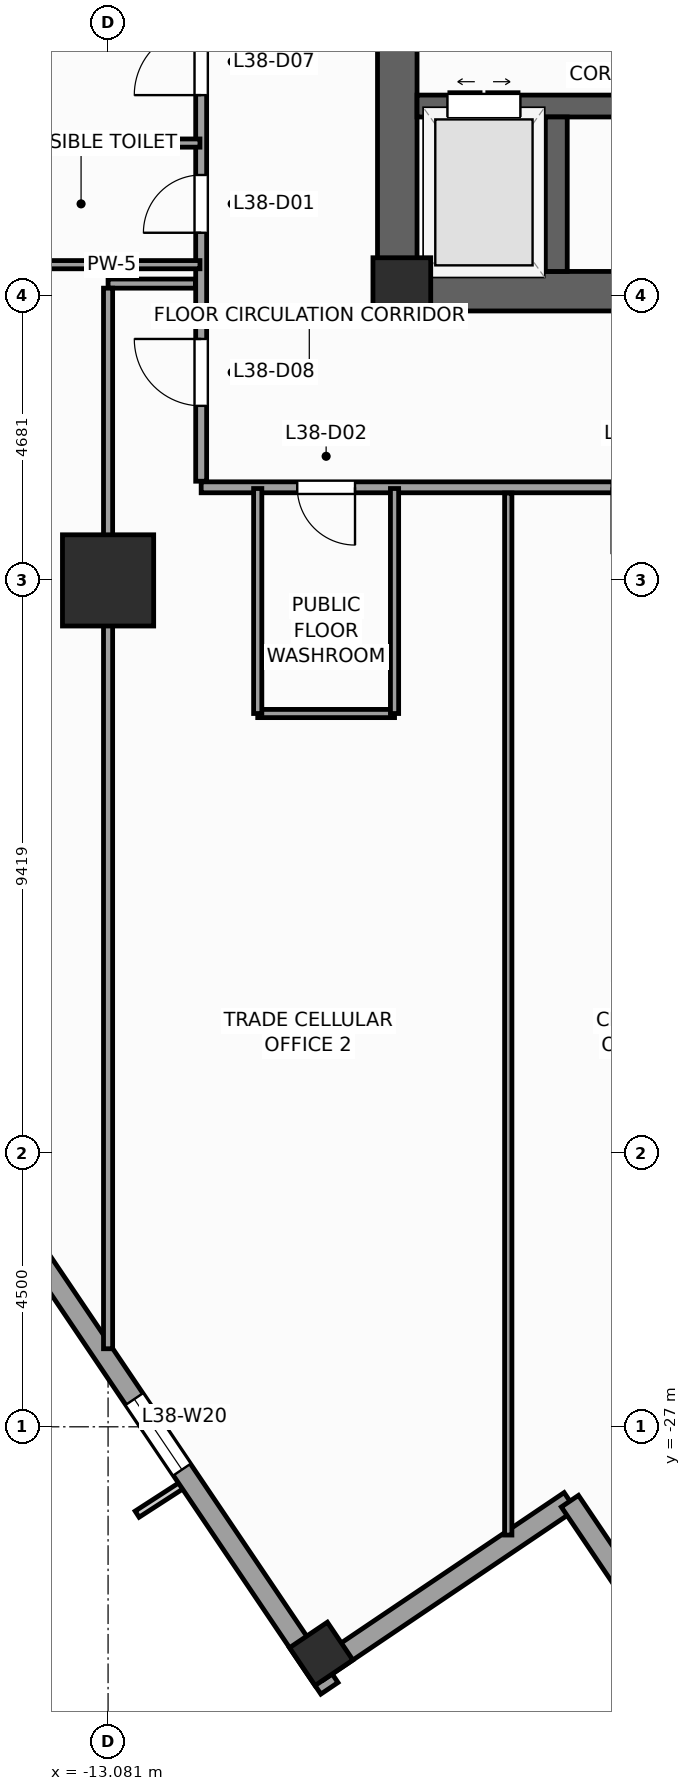
"""IFC4 building model, lengths in metres.
Left out: names, types, materials, properties, quantities, classifications, styles, units other than length and angle.
Written with IfcOpenShell. Run it as: python <this file> out.ifc"""

import sys

from ifc_helpers import new_model, si_unit, direction, frame, frame_2d, origin, origin_2d, place, context, subcontext, project, spatial, rectangle, extrude, source, transform, mapped, element, fill, save


model = new_model("IFC4")
c1 = context("Model", 3, precision=1e-05, world=origin(), true_north=direction((0.0, 1.0)))
c2 = subcontext(c1, "Body", "Model", "MODEL_VIEW")
j1 = project(units=[si_unit("LENGTHUNIT", "METRE"), si_unit("PLANEANGLEUNIT", "RADIAN")], contexts=[c1])
p1 = place(None, origin())
s1 = spatial("IfcSite", under=j1, at=p1, CompositionType="ELEMENT")
p2 = place(p1, origin())
s2 = spatial("IfcBuilding", under=s1, at=p2, CompositionType="ELEMENT")
p3 = place(p2, frame((0.0, 0.0, 160.4)))
s3 = spatial("IfcBuildingStorey", under=s2, at=p3, CompositionType="ELEMENT", Elevation=160.4)
p4 = place(p3, frame((-8.65, -8.325, 0.0), z_axis=(0.0, 0.0, 1.0), x_axis=(1.0, 0.0, 0.0)))
e1 = element("IfcWall", 1, at=p4, inside=s3, PredefinedType="SHEAR", context=c2, shape_type="SweptSolid", body=[
    extrude(rectangle(XDim=17.3, YDim=0.65, at=frame_2d((8.65, 0.0))), origin(), (0.0, 0.0, 1.0), 4.0),
])
p5 = place(p4, frame((8.0, 0.0, 0.0)))
e2 = element("IfcOpeningElement", 2, at=p5, cuts=e1, PredefinedType="OPENING", context=c2, shape_type="SweptSolid", body=[
    extrude(rectangle(XDim=1.3, YDim=2.2, at=frame_2d((0.65, 1.1))), frame((0.0, 0.335, 0.0), z_axis=(0.0, -1.0, 0.0), x_axis=(1.0, 0.0, 0.0)), (0.0, 0.0, 1.0), 0.67),
])
p6 = place(p3, frame((-8.325, -8.0, 0.0), z_axis=(0.0, 0.0, 1.0), x_axis=(0.0, 1.0, 0.0)))
e3 = element("IfcWall", 3, at=p6, inside=s3, PredefinedType="SHEAR", context=c2, shape_type="SweptSolid", body=[
    extrude(rectangle(XDim=16.0, YDim=0.65, at=frame_2d((8.0, 0.0))), origin(), (0.0, 0.0, 1.0), 4.0),
])
p7 = place(p6, frame((4.69, 0.0, 0.0)))
e4 = element("IfcOpeningElement", 4, at=p7, cuts=e3, PredefinedType="OPENING", context=c2, shape_type="SweptSolid", body=[
    extrude(rectangle(XDim=1.3, YDim=2.2, at=frame_2d((0.65, 1.1))), frame((0.0, 0.335, 0.0), z_axis=(0.0, -1.0, 0.0), x_axis=(1.0, 0.0, 0.0)), (0.0, 0.0, 1.0), 0.67),
])
p8 = place(p3, frame((-8.0, -5.28, 0.0), z_axis=(0.0, 0.0, 1.0), x_axis=(1.0, 0.0, 0.0)))
e5 = element("IfcWall", 5, at=p8, inside=s3, PredefinedType="SHEAR", context=c2, shape_type="SweptSolid", body=[
    extrude(rectangle(XDim=3.46, YDim=0.36, at=frame_2d((1.73, 0.0))), origin(), (0.0, 0.0, 1.0), 4.0),
])
p9 = place(p8, frame((0.5, 0.0, 0.0)))
e6 = element("IfcOpeningElement", 6, at=p9, cuts=e5, PredefinedType="OPENING", context=c2, shape_type="SweptSolid", body=[
    extrude(rectangle(XDim=1.2, YDim=2.25, at=frame_2d((0.6, 1.125))), frame((0.0, 0.19, 0.0), z_axis=(0.0, -1.0, 0.0), x_axis=(1.0, 0.0, 0.0)), (0.0, 0.0, 1.0), 0.38),
])
p10 = place(p3, frame((-5.71, -8.0, 0.0), z_axis=(0.0, 0.0, 1.0), x_axis=(0.0, 1.0, 0.0)))
e7 = element("IfcWall", 7, at=p10, inside=s3, PredefinedType="SHEAR", context=c2, shape_type="SweptSolid", body=[
    extrude(rectangle(XDim=2.54, YDim=0.36, at=frame_2d((1.27, 0.0))), origin(), (0.0, 0.0, 1.0), 4.0),
])
m1 = source(origin(), c2, "Body", "SweptSolid", [
    extrude(rectangle(XDim=0.95, YDim=0.95, at=origin_2d()), origin(), (0.0, 0.0, 1.0), 4.0),
])
p11 = place(p3, frame((-8.25, -8.25, 0.0), z_axis=(0.0, 0.0, 1.0), x_axis=(1.0, 0.0, 0.0)))
e8 = element("IfcColumn", 8, at=p11, inside=s3, PredefinedType="PILASTER", context=c2, shape_type="MappedRepresentation", body=[
    mapped(m1, transform((0.0, 0.0, 0.0), scale=1.0)),
])
m2 = source(origin(), c2, "Body", "SweptSolid", [
    extrude(rectangle(XDim=1.5, YDim=1.5, at=origin_2d()), origin(), (0.0, 0.0, 1.0), 4.0),
])
p12 = place(p3, frame((-13.081, -13.081, 0.0), z_axis=(0.0, 0.0, 1.0), x_axis=(1.0, 0.0, 0.0)))
e9 = element("IfcColumn", 9, at=p12, inside=s3, PredefinedType="COLUMN", context=c2, shape_type="MappedRepresentation", body=[
    mapped(m2, transform((0.0, 0.0, 0.0), scale=1.0)),
])
m3 = source(origin(), c2, "Body", "SweptSolid", [
    extrude(rectangle(XDim=0.75, YDim=0.75, at=origin_2d()), origin(), (0.0, 0.0, 1.0), 4.0),
])
p13 = place(p3, frame((-9.576, -30.734, 0.0), z_axis=(0.0, 0.0, 1.0), x_axis=(0.829037572555, 0.559192903471, 0.0)))
e10 = element("IfcColumn", 10, at=p13, inside=s3, PredefinedType="COLUMN", context=c2, shape_type="MappedRepresentation", body=[
    mapped(m3, transform((0.0, 0.0, 0.0), scale=1.0)),
])
p14 = place(p3, frame((-32.558, 2.972, 0.0), z_axis=(0.0, 0.0, 1.0), x_axis=(0.559194910251, -0.829036218961, 0.0)))
e11 = element("IfcWall", 11, at=p14, inside=s3, PredefinedType="STANDARD", context=c2, shape_type="SweptSolid", body=[
    extrude(rectangle(XDim=41.34, YDim=0.34, at=frame_2d((20.67, 0.0))), origin(), (0.0, 0.0, 1.0), 3.04),
])
p15 = place(p14, frame((5.761, 0.0, 0.56)))
e12 = element("IfcOpeningElement", 12, at=p15, cuts=e11, PredefinedType="OPENING", context=c2, shape_type="SweptSolid", body=[
    extrude(rectangle(XDim=1.4, YDim=2.4, at=frame_2d((0.7, 1.2))), frame((0.0, 0.18, 0.0), z_axis=(0.0, -1.0, 0.0), x_axis=(1.0, 0.0, 0.0)), (0.0, 0.0, 1.0), 0.36),
])
p16 = place(p14, frame((11.064, 0.0, 0.61)))
e13 = element("IfcOpeningElement", 13, at=p16, cuts=e11, PredefinedType="OPENING", context=c2, shape_type="SweptSolid", body=[
    extrude(rectangle(XDim=1.85, YDim=2.35, at=frame_2d((0.925, 1.175))), frame((0.0, 0.18, 0.0), z_axis=(0.0, -1.0, 0.0), x_axis=(1.0, 0.0, 0.0)), (0.0, 0.0, 1.0), 0.36),
])
p17 = place(p14, frame((18.168, 0.0, 0.61)))
e14 = element("IfcOpeningElement", 14, at=p17, cuts=e11, PredefinedType="OPENING", context=c2, shape_type="SweptSolid", body=[
    extrude(rectangle(XDim=1.85, YDim=2.35, at=frame_2d((0.925, 1.175))), frame((0.0, 0.18, 0.0), z_axis=(0.0, -1.0, 0.0), x_axis=(1.0, 0.0, 0.0)), (0.0, 0.0, 1.0), 0.36),
])
p18 = place(p14, frame((27.186, 0.0, 0.61)))
e15 = element("IfcOpeningElement", 15, at=p18, cuts=e11, PredefinedType="OPENING", context=c2, shape_type="SweptSolid", body=[
    extrude(rectangle(XDim=1.85, YDim=2.35, at=frame_2d((0.925, 1.175))), frame((0.0, 0.18, 0.0), z_axis=(0.0, -1.0, 0.0), x_axis=(1.0, 0.0, 0.0)), (0.0, 0.0, 1.0), 0.36),
])
p19 = place(p14, frame((35.602, 0.0, 0.56)))
e16 = element("IfcOpeningElement", 16, at=p19, cuts=e11, PredefinedType="OPENING", context=c2, shape_type="SweptSolid", body=[
    extrude(rectangle(XDim=1.4, YDim=2.4, at=frame_2d((0.7, 1.2))), frame((0.0, 0.18, 0.0), z_axis=(0.0, -1.0, 0.0), x_axis=(1.0, 0.0, 0.0)), (0.0, 0.0, 1.0), 0.36),
])
p20 = place(p3, frame((-9.631, -31.019, 0.0), z_axis=(0.0, 0.0, 1.0), x_axis=(0.829025804298, 0.559210350234, 0.0)))
e17 = element("IfcWall", 17, at=p20, inside=s3, PredefinedType="STANDARD", context=c2, shape_type="SweptSolid", body=[
    extrude(rectangle(XDim=5.0, YDim=0.34, at=frame_2d((2.5, 0.0))), origin(), (0.0, 0.0, 1.0), 3.74),
])
p21 = place(p3, frame((-5.486, -28.223, 0.0), z_axis=(0.0, 0.0, 1.0), x_axis=(0.559171107879, -0.82905227345, 0.0)))
e18 = element("IfcWall", 18, at=p21, inside=s3, PredefinedType="STANDARD", context=c2, shape_type="SweptSolid", body=[
    extrude(rectangle(XDim=5.17, YDim=0.34, at=frame_2d((2.585, 0.0))), origin(), (0.0, 0.0, 1.0), 3.04),
])
p22 = place(p21, frame((1.885, 0.0, 0.56)))
e19 = element("IfcOpeningElement", 19, at=p22, cuts=e18, PredefinedType="OPENING", context=c2, shape_type="SweptSolid", body=[
    extrude(rectangle(XDim=1.4, YDim=2.4, at=frame_2d((0.7, 1.2))), frame((0.0, 0.18, 0.0), z_axis=(0.0, -1.0, 0.0), x_axis=(1.0, 0.0, 0.0)), (0.0, 0.0, 1.0), 0.36),
])
p23 = place(p3, frame((-11.55, -11.55, 0.0), z_axis=(0.0, 0.0, 1.0), x_axis=(1.0, 0.0, 0.0)))
e20 = element("IfcWall", 20, at=p23, inside=s3, PredefinedType="PARTITIONING", context=c2, shape_type="SweptSolid", body=[
    extrude(rectangle(XDim=22.0, YDim=0.18, at=frame_2d((11.0, 0.0))), origin(), (0.0, 0.0, 1.0), 3.74),
])
p24 = place(p23, frame((1.58, 0.0, 0.0)))
e21 = element("IfcOpeningElement", 21, at=p24, cuts=e20, PredefinedType="OPENING", context=c2, shape_type="SweptSolid", body=[
    extrude(rectangle(XDim=0.95, YDim=2.1, at=frame_2d((0.475, 1.05))), frame((0.0, 0.1, 0.0), z_axis=(0.0, -1.0, 0.0), x_axis=(1.0, 0.0, 0.0)), (0.0, 0.0, 1.0), 0.2),
])
p25 = place(p23, frame((6.75, 0.0, 0.0)))
e22 = element("IfcOpeningElement", 22, at=p25, cuts=e20, PredefinedType="OPENING", context=c2, shape_type="SweptSolid", body=[
    extrude(rectangle(XDim=1.1, YDim=2.2, at=frame_2d((0.55, 1.1))), frame((0.0, 0.1, 0.0), z_axis=(0.0, -1.0, 0.0), x_axis=(1.0, 0.0, 0.0)), (0.0, 0.0, 1.0), 0.2),
])
p26 = place(p23, frame((11.25, 0.0, 0.0)))
e23 = element("IfcOpeningElement", 23, at=p26, cuts=e20, PredefinedType="OPENING", context=c2, shape_type="SweptSolid", body=[
    extrude(rectangle(XDim=1.1, YDim=2.2, at=frame_2d((0.55, 1.1))), frame((0.0, 0.1, 0.0), z_axis=(0.0, -1.0, 0.0), x_axis=(1.0, 0.0, 0.0)), (0.0, 0.0, 1.0), 0.2),
])
p27 = place(p23, frame((15.75, 0.0, 0.0)))
e24 = element("IfcOpeningElement", 24, at=p27, cuts=e20, PredefinedType="OPENING", context=c2, shape_type="SweptSolid", body=[
    extrude(rectangle(XDim=1.1, YDim=2.2, at=frame_2d((0.55, 1.1))), frame((0.0, 0.1, 0.0), z_axis=(0.0, -1.0, 0.0), x_axis=(1.0, 0.0, 0.0)), (0.0, 0.0, 1.0), 0.2),
])
p28 = place(p23, frame((19.561, 0.0, 0.0)))
e25 = element("IfcOpeningElement", 25, at=p28, cuts=e20, PredefinedType="OPENING", context=c2, shape_type="SweptSolid", body=[
    extrude(rectangle(XDim=1.1, YDim=2.2, at=frame_2d((0.55, 1.1))), frame((0.0, 0.1, 0.0), z_axis=(0.0, -1.0, 0.0), x_axis=(1.0, 0.0, 0.0)), (0.0, 0.0, 1.0), 0.2),
])
p29 = place(p3, frame((-11.55, -11.45, 0.0), z_axis=(0.0, 0.0, 1.0), x_axis=(0.0, 1.0, 0.0)))
e26 = element("IfcWall", 26, at=p29, inside=s3, PredefinedType="PARTITIONING", context=c2, shape_type="SweptSolid", body=[
    extrude(rectangle(XDim=13.05, YDim=0.18, at=frame_2d((6.525, 0.0))), origin(), (0.0, 0.0, 1.0), 3.74),
])
p30 = place(p29, frame((4.086, 0.0, 0.0)))
e27 = element("IfcOpeningElement", 27, at=p30, cuts=e26, PredefinedType="OPENING", context=c2, shape_type="SweptSolid", body=[
    extrude(rectangle(XDim=0.95, YDim=2.1, at=frame_2d((0.475, 1.05))), frame((0.0, 0.1, 0.0), z_axis=(0.0, -1.0, 0.0), x_axis=(1.0, 0.0, 0.0)), (0.0, 0.0, 1.0), 0.2),
])
p31 = place(p29, frame((11.01, 0.0, 0.0)))
e28 = element("IfcOpeningElement", 28, at=p31, cuts=e26, PredefinedType="OPENING", context=c2, shape_type="SweptSolid", body=[
    extrude(rectangle(XDim=1.1, YDim=2.2, at=frame_2d((0.55, 1.1))), frame((0.0, 0.1, 0.0), z_axis=(0.0, -1.0, 0.0), x_axis=(1.0, 0.0, 0.0)), (0.0, 0.0, 1.0), 0.2),
])
p32 = place(p29, frame((8.775, 0.0, 0.0)))
e29 = element("IfcOpeningElement", 29, at=p32, cuts=e26, PredefinedType="OPENING", context=c2, shape_type="SweptSolid", body=[
    extrude(rectangle(XDim=1.1, YDim=2.2, at=frame_2d((0.55, 1.1))), frame((0.0, 0.1, 0.0), z_axis=(0.0, -1.0, 0.0), x_axis=(1.0, 0.0, 0.0)), (0.0, 0.0, 1.0), 0.2),
])
p33 = place(p29, frame((6.35, 0.0, 0.0)))
e30 = element("IfcOpeningElement", 30, at=p33, cuts=e26, PredefinedType="OPENING", context=c2, shape_type="SweptSolid", body=[
    extrude(rectangle(XDim=1.1, YDim=2.2, at=frame_2d((0.55, 1.1))), frame((0.0, 0.1, 0.0), z_axis=(0.0, -1.0, 0.0), x_axis=(1.0, 0.0, 0.0)), (0.0, 0.0, 1.0), 0.2),
])
p34 = place(p29, frame((1.24, 0.0, 0.0)))
e31 = element("IfcOpeningElement", 31, at=p34, cuts=e26, PredefinedType="OPENING", context=c2, shape_type="SweptSolid", body=[
    extrude(rectangle(XDim=1.1, YDim=2.2, at=frame_2d((0.55, 1.1))), frame((0.0, 0.1, 0.0), z_axis=(0.0, -1.0, 0.0), x_axis=(1.0, 0.0, 0.0)), (0.0, 0.0, 1.0), 0.2),
])
p35 = place(p3, frame((-11.645, -8.2, 0.0), z_axis=(0.0, 0.0, 1.0), x_axis=(-1.0, 0.0, 0.0)))
e32 = element("IfcWall", 32, at=p35, inside=s3, PredefinedType="PARTITIONING", context=c2, shape_type="SweptSolid", body=[
    extrude(rectangle(XDim=1.436, YDim=0.15, at=frame_2d((0.718, 0.0))), origin(), (0.0, 0.0, 1.0), 3.74),
])
p36 = place(p3, frame((-13.081, -8.275, 0.0), z_axis=(0.0, 0.0, 1.0), x_axis=(0.0, -1.0, 0.0)))
e33 = element("IfcWall", 33, at=p36, inside=s3, PredefinedType="PARTITIONING", context=c2, shape_type="SweptSolid", body=[
    extrude(rectangle(XDim=17.441, YDim=0.15, at=frame_2d((8.721, 0.0))), origin(), (0.0, 0.0, 1.0), 2.84),
])
p37 = place(p3, frame((-6.5, -28.78, 0.0), z_axis=(0.0, 0.0, 1.0), x_axis=(0.0, 1.0, 0.0)))
e34 = element("IfcWall", 34, at=p37, inside=s3, PredefinedType="PARTITIONING", context=c2, shape_type="SweptSolid", body=[
    extrude(rectangle(XDim=17.135, YDim=0.12, at=frame_2d((8.567, 0.0))), origin(), (0.0, 0.0, 1.0), 3.74),
])
for number, where, z_axis, x_axis in (
    (35, (-14.47, -7.889, 0.0), (0.0, 0.0, 1.0), (1.0, 0.0, 0.0)),
    (36, (-14.47, -5.889, 0.0), (0.0, 0.0, 1.0), (1.0, 0.0, 0.0)),
):
    element("IfcWall", number, at=place(p3, frame(where, z_axis=z_axis, x_axis=x_axis)), inside=s3, PredefinedType="PARTITIONING", context=c2, shape_type="SweptSolid", body=[
        extrude(rectangle(XDim=2.9, YDim=0.135, at=frame_2d((1.45, 0.0))), origin(), (0.0, 0.0, 1.0), 3.74),
    ])
p38 = place(p3, frame((-10.62, -15.27, 0.0), z_axis=(0.0, 0.0, 1.0), x_axis=(1.0, 0.0, 0.0)))
e37 = element("IfcWall", 37, at=p38, inside=s3, PredefinedType="PARTITIONING", context=c2, shape_type="SweptSolid", body=[
    extrude(rectangle(XDim=2.25, YDim=0.135, at=frame_2d((1.125, 0.0))), origin(), (0.0, 0.0, 1.0), 3.74),
])
for number, where, z_axis, x_axis in (
    (38, (-8.37, -15.27, 0.0), (0.0, 0.0, 1.0), (0.0, 1.0, 0.0)),
    (39, (-10.62, -15.27, 0.0), (0.0, 0.0, 1.0), (0.0, 1.0, 0.0)),
):
    element("IfcWall", number, at=place(p3, frame(where, z_axis=z_axis, x_axis=x_axis)), inside=s3, PredefinedType="PARTITIONING", context=c2, shape_type="SweptSolid", body=[
        extrude(rectangle(XDim=3.7, YDim=0.135, at=frame_2d((1.85, 0.0))), origin(), (0.0, 0.0, 1.0), 3.74),
    ])
m4 = source(origin(), c2, "Body", "SweptSolid", [
    extrude(rectangle(XDim=1.4, YDim=2.4, at=frame_2d((0.7, 1.2))), frame((0.0, 0.03, 0.0), z_axis=(0.0, -1.0, 0.0), x_axis=(1.0, 0.0, 0.0)), (0.0, 0.0, 1.0), 0.06),
])
p39 = place(p19, origin())
e40 = element("IfcWindow", 40, at=p39, inside=s3, PartitioningType="SINGLE_PANEL", PredefinedType="WINDOW", context=c2, shape_type="MappedRepresentation", body=[
    mapped(m4, transform((0.0, 0.0, 0.0), scale=1.0)),
])
fill(e16, e40)
m5 = source(origin(), c2, "Body", "SweptSolid", [
    extrude(rectangle(XDim=1.2, YDim=2.25, at=frame_2d((0.6, 1.125))), frame((0.0, 0.025, 0.0), z_axis=(0.0, -1.0, 0.0), x_axis=(1.0, 0.0, 0.0)), (0.0, 0.0, 1.0), 0.05),
])
p40 = place(p9, origin())
e41 = element("IfcDoor", 41, at=p40, inside=s3, OperationType="DOUBLE_DOOR_SLIDING", PredefinedType="DOOR", context=c2, shape_type="MappedRepresentation", body=[
    mapped(m5, transform((0.0, 0.0, 0.0), scale=1.0)),
])
fill(e6, e41)
m6 = source(origin(), c2, "Body", "SweptSolid", [
    extrude(rectangle(XDim=0.95, YDim=2.1, at=frame_2d((0.475, 1.05))), frame((0.0, 0.025, 0.0), z_axis=(0.0, -1.0, 0.0), x_axis=(1.0, 0.0, 0.0)), (0.0, 0.0, 1.0), 0.05),
])
p41 = place(p30, origin())
e42 = element("IfcDoor", 42, at=p41, inside=s3, OperationType="SINGLE_SWING_LEFT", PredefinedType="DOOR", context=c2, shape_type="MappedRepresentation", body=[
    mapped(m6, transform((0.0, 0.0, 0.0), scale=1.0)),
])
fill(e27, e42)
p42 = place(p24, frame((0.95, 0.0, 0.0), z_axis=(0.0, 0.0, 1.0), x_axis=(-1.0, 0.0, 0.0)))
e43 = element("IfcDoor", 43, at=p42, inside=s3, OperationType="SINGLE_SWING_RIGHT", PredefinedType="DOOR", context=c2, shape_type="MappedRepresentation", body=[
    mapped(m6, transform((0.0, 0.0, 0.0), scale=1.0)),
])
fill(e21, e43)
m7 = source(origin(), c2, "Body", "SweptSolid", [
    extrude(rectangle(XDim=1.1, YDim=2.2, at=frame_2d((0.55, 1.1))), frame((0.0, 0.025, 0.0), z_axis=(0.0, -1.0, 0.0), x_axis=(1.0, 0.0, 0.0)), (0.0, 0.0, 1.0), 0.05),
])
p43 = place(p33, origin())
e44 = element("IfcDoor", 44, at=p43, inside=s3, OperationType="SINGLE_SWING_LEFT", PredefinedType="DOOR", context=c2, shape_type="MappedRepresentation", body=[
    mapped(m7, transform((0.0, 0.0, 0.0), scale=1.0)),
])
fill(e30, e44)
p44 = place(p34, origin())
e45 = element("IfcDoor", 45, at=p44, inside=s3, OperationType="SINGLE_SWING_RIGHT", PredefinedType="DOOR", context=c2, shape_type="MappedRepresentation", body=[
    mapped(m7, transform((0.0, 0.0, 0.0), scale=1.0)),
])
fill(e31, e45)
save(model, sys.argv[1])
